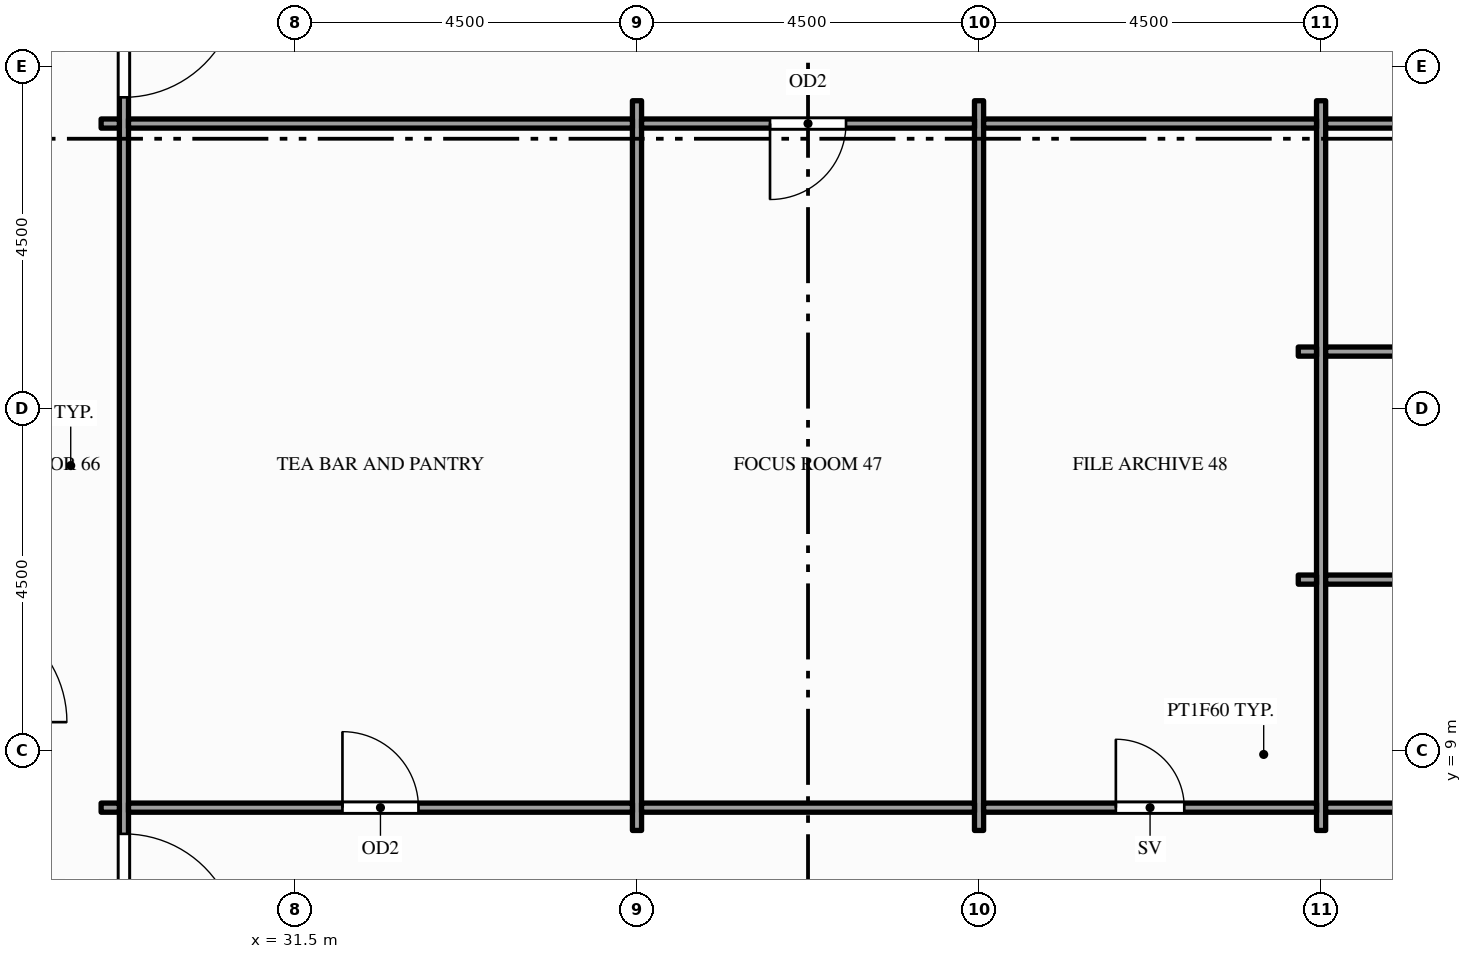
"""IFC4 building model, lengths in metres.
Left out: names, types, materials, properties, quantities, classifications, styles, units other than length and angle.
Written with IfcOpenShell. Run it as: python <this file> out.ifc"""

import sys

from ifc_helpers import new_model, si_unit, direction, frame, frame_2d, origin, place, context, subcontext, project, spatial, rectangle, extrude, element, fill, save


model = new_model("IFC4")
c1 = context("Model", 3, precision=1e-05, world=origin(), true_north=direction((0.0, 1.0)))
c2 = subcontext(c1, "Body", "Model", "MODEL_VIEW")
j1 = project(units=[si_unit("LENGTHUNIT", "METRE"), si_unit("PLANEANGLEUNIT", "RADIAN")], contexts=[c1])
p1 = place(None, origin())
s1 = spatial("IfcSite", under=j1, at=p1, CompositionType="ELEMENT")
p2 = place(p1, origin())
s2 = spatial("IfcBuilding", under=s1, at=p2, CompositionType="ELEMENT")
p3 = place(p2, frame((0.0, 0.0, 179.0)))
s3 = spatial("IfcBuildingStorey", under=s2, at=p3, CompositionType="ELEMENT", Elevation=179.0)
p4 = place(p3, frame((29.25, 5.7, 0.0), z_axis=(0.0, 0.0, 1.0), x_axis=(0.0, 1.0, 0.0)))
e1 = element("IfcWall", 1, at=p4, inside=s3, PredefinedType="PARTITIONING", context=c2, shape_type="SweptSolid", body=[
    extrude(rectangle(XDim=14.1, YDim=0.12, at=frame_2d((7.05, 0.0))), origin(), (0.0, 0.0, 1.0), 2.87),
])
p5 = place(p4, frame((0.705, 0.0, 0.0)))
e2 = element("IfcOpeningElement", 2, at=p5, cuts=e1, PredefinedType="OPENING", context=c2, shape_type="SweptSolid", body=[
    extrude(rectangle(XDim=1.5, YDim=2.1, at=frame_2d((0.75, 1.05))), frame((0.0, 0.07, 0.0), z_axis=(0.0, -1.0, 0.0), x_axis=(1.0, 0.0, 0.0)), (0.0, 0.0, 1.0), 0.14),
])
p6 = place(p4, frame((11.895, 0.0, 0.0)))
e3 = element("IfcOpeningElement", 3, at=p6, cuts=e1, PredefinedType="OPENING", context=c2, shape_type="SweptSolid", body=[
    extrude(rectangle(XDim=1.5, YDim=2.1, at=frame_2d((0.75, 1.05))), frame((0.0, 0.07, 0.0), z_axis=(0.0, -1.0, 0.0), x_axis=(1.0, 0.0, 0.0)), (0.0, 0.0, 1.0), 0.14),
])
for number, where, z_axis, x_axis in (
    (4, (36.0, 7.95, 0.0), (0.0, 0.0, 1.0), (0.0, 1.0, 0.0)),
    (5, (40.5, 7.95, 0.0), (0.0, 0.0, 1.0), (0.0, 1.0, 0.0)),
    (6, (45.0, 7.95, 0.0), (0.0, 0.0, 1.0), (0.0, 1.0, 0.0)),
):
    element("IfcWall", number, at=place(p3, frame(where, z_axis=z_axis, x_axis=x_axis)), inside=s3, PredefinedType="PARTITIONING", context=c2, shape_type="SweptSolid", body=[
        extrude(rectangle(XDim=9.6, YDim=0.12, at=frame_2d((4.8, 0.0))), origin(), (0.0, 0.0, 1.0), 2.87),
    ])
p7 = place(p3, frame((28.95, 8.25, 0.0), z_axis=(0.0, 0.0, 1.0), x_axis=(1.0, 0.0, 0.0)))
e7 = element("IfcWall", 7, at=p7, inside=s3, PredefinedType="PARTITIONING", context=c2, shape_type="SweptSolid", body=[
    extrude(rectangle(XDim=0.24, YDim=0.12, at=frame_2d((0.12, 0.0))), origin(), (0.0, 0.0, 1.0), 2.87),
])
p8 = place(p3, frame((29.31, 8.25, 0.0), z_axis=(0.0, 0.0, 1.0), x_axis=(1.0, 0.0, 0.0)))
e8 = element("IfcWall", 8, at=p8, inside=s3, PredefinedType="PARTITIONING", context=c2, shape_type="SweptSolid", body=[
    extrude(rectangle(XDim=6.63, YDim=0.12, at=frame_2d((3.315, 0.0))), origin(), (0.0, 0.0, 1.0), 2.87),
])
p9 = place(p8, frame((2.815, 0.0, 0.0)))
e9 = element("IfcOpeningElement", 9, at=p9, cuts=e8, PredefinedType="OPENING", context=c2, shape_type="SweptSolid", body=[
    extrude(rectangle(XDim=1.0, YDim=2.1, at=frame_2d((0.5, 1.05))), frame((0.0, 0.07, 0.0), z_axis=(0.0, -1.0, 0.0), x_axis=(1.0, 0.0, 0.0)), (0.0, 0.0, 1.0), 0.14),
])
p10 = place(p3, frame((36.06, 8.25, 0.0), z_axis=(0.0, 0.0, 1.0), x_axis=(1.0, 0.0, 0.0)))
e10 = element("IfcWall", 10, at=p10, inside=s3, PredefinedType="PARTITIONING", context=c2, shape_type="SweptSolid", body=[
    extrude(rectangle(XDim=4.38, YDim=0.12, at=frame_2d((2.19, 0.0))), origin(), (0.0, 0.0, 1.0), 2.87),
])
p11 = place(p3, frame((40.56, 8.25, 0.0), z_axis=(0.0, 0.0, 1.0), x_axis=(1.0, 0.0, 0.0)))
e11 = element("IfcWall", 11, at=p11, inside=s3, PredefinedType="PARTITIONING", context=c2, shape_type="SweptSolid", body=[
    extrude(rectangle(XDim=4.38, YDim=0.12, at=frame_2d((2.19, 0.0))), origin(), (0.0, 0.0, 1.0), 2.87),
])
p12 = place(p11, frame((1.74, 0.0, 0.0)))
e12 = element("IfcOpeningElement", 12, at=p12, cuts=e11, PredefinedType="OPENING", context=c2, shape_type="SweptSolid", body=[
    extrude(rectangle(XDim=0.9, YDim=2.1, at=frame_2d((0.45, 1.05))), frame((0.0, 0.07, 0.0), z_axis=(0.0, -1.0, 0.0), x_axis=(1.0, 0.0, 0.0)), (0.0, 0.0, 1.0), 0.14),
])
p13 = place(p3, frame((45.06, 8.25, 0.0), z_axis=(0.0, 0.0, 1.0), x_axis=(1.0, 0.0, 0.0)))
e13 = element("IfcWall", 13, at=p13, inside=s3, PredefinedType="PARTITIONING", context=c2, shape_type="SweptSolid", body=[
    extrude(rectangle(XDim=4.38, YDim=0.12, at=frame_2d((2.19, 0.0))), origin(), (0.0, 0.0, 1.0), 2.87),
])
p14 = place(p3, frame((44.7, 11.25, 0.0), z_axis=(0.0, 0.0, 1.0), x_axis=(1.0, 0.0, 0.0)))
e14 = element("IfcWall", 14, at=p14, inside=s3, PredefinedType="PARTITIONING", context=c2, shape_type="SweptSolid", body=[
    extrude(rectangle(XDim=0.24, YDim=0.12, at=frame_2d((0.12, 0.0))), origin(), (0.0, 0.0, 1.0), 2.87),
])
p15 = place(p3, frame((45.06, 11.25, 0.0), z_axis=(0.0, 0.0, 1.0), x_axis=(1.0, 0.0, 0.0)))
e15 = element("IfcWall", 15, at=p15, inside=s3, PredefinedType="PARTITIONING", context=c2, shape_type="SweptSolid", body=[
    extrude(rectangle(XDim=4.38, YDim=0.12, at=frame_2d((2.19, 0.0))), origin(), (0.0, 0.0, 1.0), 2.87),
])
p16 = place(p3, frame((44.7, 14.25, 0.0), z_axis=(0.0, 0.0, 1.0), x_axis=(1.0, 0.0, 0.0)))
e16 = element("IfcWall", 16, at=p16, inside=s3, PredefinedType="PARTITIONING", context=c2, shape_type="SweptSolid", body=[
    extrude(rectangle(XDim=0.24, YDim=0.12, at=frame_2d((0.12, 0.0))), origin(), (0.0, 0.0, 1.0), 2.87),
])
p17 = place(p3, frame((45.06, 14.25, 0.0), z_axis=(0.0, 0.0, 1.0), x_axis=(1.0, 0.0, 0.0)))
e17 = element("IfcWall", 17, at=p17, inside=s3, PredefinedType="PARTITIONING", context=c2, shape_type="SweptSolid", body=[
    extrude(rectangle(XDim=4.38, YDim=0.12, at=frame_2d((2.19, 0.0))), origin(), (0.0, 0.0, 1.0), 2.87),
])
p18 = place(p3, frame((28.95, 17.25, 0.0), z_axis=(0.0, 0.0, 1.0), x_axis=(1.0, 0.0, 0.0)))
e18 = element("IfcWall", 18, at=p18, inside=s3, PredefinedType="PARTITIONING", context=c2, shape_type="SweptSolid", body=[
    extrude(rectangle(XDim=0.24, YDim=0.12, at=frame_2d((0.12, 0.0))), origin(), (0.0, 0.0, 1.0), 2.87),
])
p19 = place(p3, frame((29.31, 17.25, 0.0), z_axis=(0.0, 0.0, 1.0), x_axis=(1.0, 0.0, 0.0)))
e19 = element("IfcWall", 19, at=p19, inside=s3, PredefinedType="PARTITIONING", context=c2, shape_type="SweptSolid", body=[
    extrude(rectangle(XDim=6.63, YDim=0.12, at=frame_2d((3.315, 0.0))), origin(), (0.0, 0.0, 1.0), 2.87),
])
p20 = place(p3, frame((36.06, 17.25, 0.0), z_axis=(0.0, 0.0, 1.0), x_axis=(1.0, 0.0, 0.0)))
e20 = element("IfcWall", 20, at=p20, inside=s3, PredefinedType="PARTITIONING", context=c2, shape_type="SweptSolid", body=[
    extrude(rectangle(XDim=4.38, YDim=0.12, at=frame_2d((2.19, 0.0))), origin(), (0.0, 0.0, 1.0), 2.87),
])
p21 = place(p20, frame((1.69, 0.0, 0.0)))
e21 = element("IfcOpeningElement", 21, at=p21, cuts=e20, PredefinedType="OPENING", context=c2, shape_type="SweptSolid", body=[
    extrude(rectangle(XDim=1.0, YDim=2.1, at=frame_2d((0.5, 1.05))), frame((0.0, 0.07, 0.0), z_axis=(0.0, -1.0, 0.0), x_axis=(1.0, 0.0, 0.0)), (0.0, 0.0, 1.0), 0.14),
])
for number, where, z_axis, x_axis in (
    (22, (40.56, 17.25, 0.0), (0.0, 0.0, 1.0), (1.0, 0.0, 0.0)),
    (23, (45.06, 17.25, 0.0), (0.0, 0.0, 1.0), (1.0, 0.0, 0.0)),
):
    element("IfcWall", number, at=place(p3, frame(where, z_axis=z_axis, x_axis=x_axis)), inside=s3, PredefinedType="PARTITIONING", context=c2, shape_type="SweptSolid", body=[
        extrude(rectangle(XDim=4.38, YDim=0.12, at=frame_2d((2.19, 0.0))), origin(), (0.0, 0.0, 1.0), 2.87),
    ])
p22 = place(p5, origin())
e24 = element("IfcDoor", 24, at=p22, inside=s3, OperationType="SINGLE_SWING_LEFT", PredefinedType="DOOR", context=c2, shape_type="SweptSolid", body=[
    extrude(rectangle(XDim=1.5, YDim=2.1, at=frame_2d((0.75, 1.05))), frame((0.0, 0.025, 0.0), z_axis=(0.0, -1.0, 0.0), x_axis=(1.0, 0.0, 0.0)), (0.0, 0.0, 1.0), 0.05),
])
fill(e2, e24)
p23 = place(p6, origin())
e25 = element("IfcDoor", 25, at=p23, inside=s3, OperationType="SINGLE_SWING_RIGHT", PredefinedType="DOOR", context=c2, shape_type="SweptSolid", body=[
    extrude(rectangle(XDim=1.5, YDim=2.1, at=frame_2d((0.75, 1.05))), frame((0.0, 0.025, 0.0), z_axis=(0.0, -1.0, 0.0), x_axis=(1.0, 0.0, 0.0)), (0.0, 0.0, 1.0), 0.05),
])
fill(e3, e25)
p24 = place(p9, origin())
e26 = element("IfcDoor", 26, at=p24, inside=s3, OperationType="SINGLE_SWING_LEFT", PredefinedType="DOOR", context=c2, shape_type="SweptSolid", body=[
    extrude(rectangle(XDim=1.0, YDim=2.1, at=frame_2d((0.5, 1.05))), frame((0.0, 0.025, 0.0), z_axis=(0.0, -1.0, 0.0), x_axis=(1.0, 0.0, 0.0)), (0.0, 0.0, 1.0), 0.05),
])
fill(e9, e26)
p25 = place(p21, origin())
e27 = element("IfcDoor", 27, at=p25, inside=s3, OperationType="SINGLE_SWING_LEFT", PredefinedType="DOOR", context=c2, shape_type="SweptSolid", body=[
    extrude(rectangle(XDim=1.0, YDim=2.1, at=frame_2d((0.5, 1.05))), frame((0.0, 0.025, 0.0), z_axis=(0.0, -1.0, 0.0), x_axis=(1.0, 0.0, 0.0)), (0.0, 0.0, 1.0), 0.05),
])
fill(e21, e27)
p26 = place(p12, origin())
e28 = element("IfcDoor", 28, at=p26, inside=s3, OperationType="SINGLE_SWING_LEFT", PredefinedType="DOOR", context=c2, shape_type="SweptSolid", body=[
    extrude(rectangle(XDim=0.9, YDim=2.1, at=frame_2d((0.45, 1.05))), frame((0.0, 0.025, 0.0), z_axis=(0.0, -1.0, 0.0), x_axis=(1.0, 0.0, 0.0)), (0.0, 0.0, 1.0), 0.05),
])
fill(e12, e28)
save(model, sys.argv[1])
